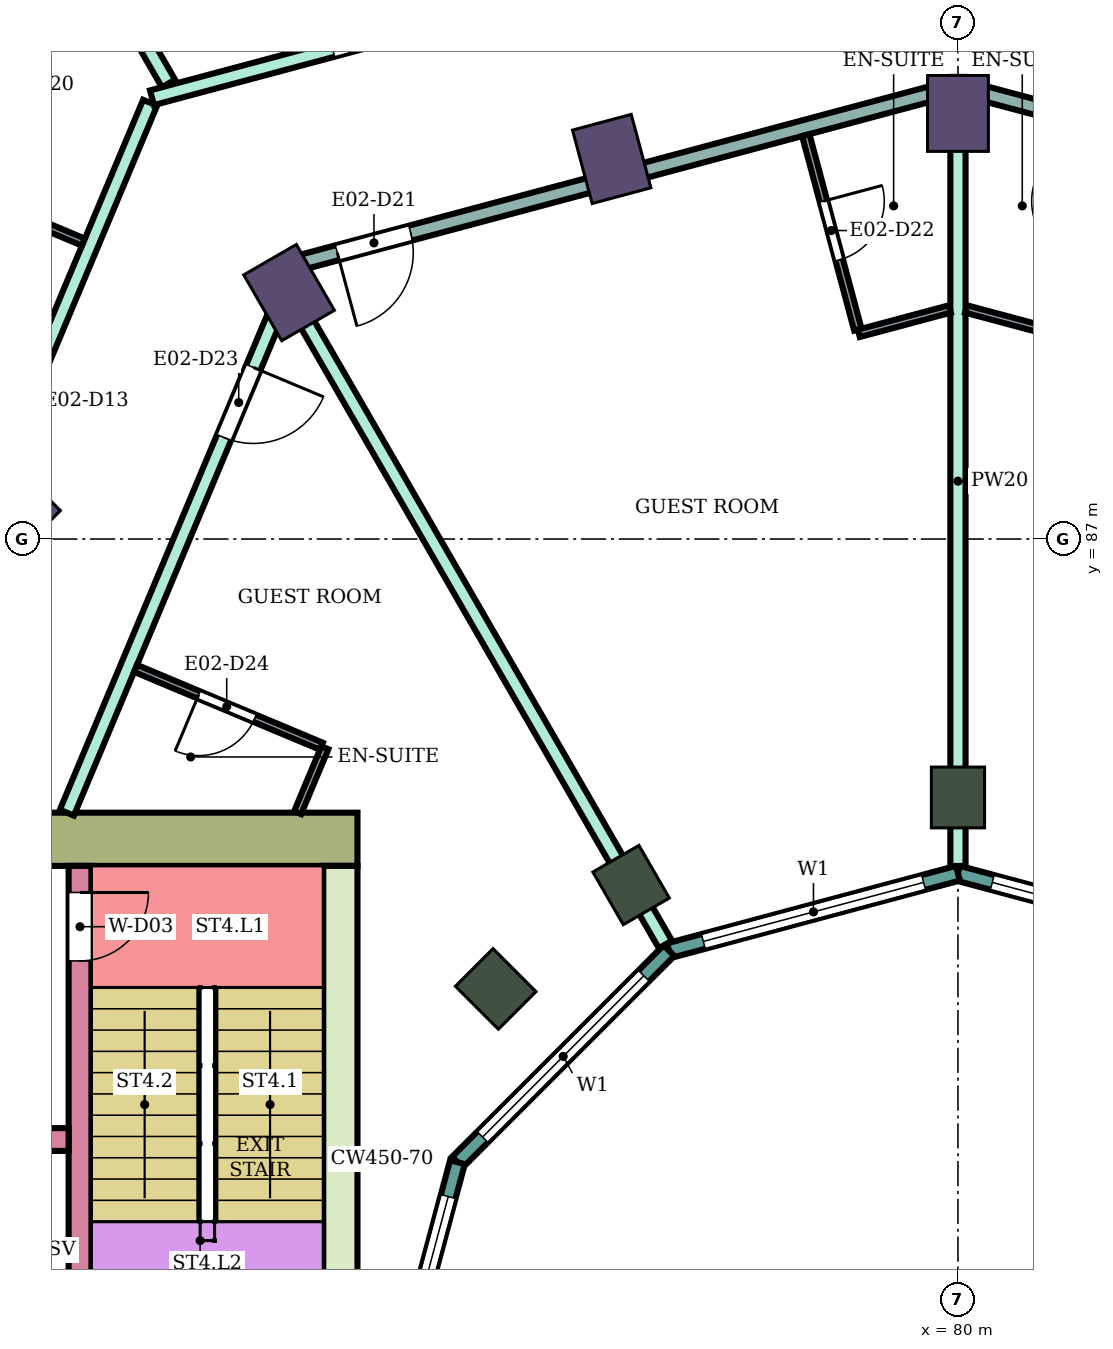
"""IFC4 building model, lengths in metres.
Left out: names, types, materials, properties, quantities, classifications, styles, units other than length and angle.
Written with IfcOpenShell. Run it as: python <this file> out.ifc"""

import sys

from ifc_helpers import new_model, si_unit, direction, frame, frame_2d, origin, origin_2d, place, context, subcontext, project, spatial, rectangle, extrude, element, fill, save


model = new_model("IFC4")
c1 = context("Model", 3, precision=1e-05, world=origin(), true_north=direction((0.0, 1.0)))
c2 = subcontext(c1, "Body", "Model", "MODEL_VIEW")
j1 = project(units=[si_unit("LENGTHUNIT", "METRE"), si_unit("PLANEANGLEUNIT", "RADIAN")], contexts=[c1])
p1 = place(None, origin())
s1 = spatial("IfcSite", under=j1, at=p1, CompositionType="ELEMENT")
p2 = place(p1, origin())
s2 = spatial("IfcBuilding", under=s1, at=p2, CompositionType="ELEMENT")
p3 = place(p2, frame((0.0, 0.0, 126.3)))
s3 = spatial("IfcBuildingStorey", under=s2, at=p3, CompositionType="ELEMENT", Elevation=126.3)
for number, where, z_axis, x_axis in (
    (1, (80.0, 92.6, 0.0), (0.0, 0.0, 1.0), (0.0, 1.0, 0.0)),
    (2, (75.445, 92.0, 0.0), (0.0, 0.0, 1.0), (-0.259, 0.966, 0.0)),
    (3, (71.2, 90.242, 0.0), (0.0, 0.0, 1.0), (-0.5, 0.866, 0.0)),
    (4, (67.555, 87.445, 0.0), (0.0, 0.0, 1.0), (-0.707, 0.707, 0.0)),
):
    element("IfcColumn", number, at=place(p3, frame(where, z_axis=z_axis, x_axis=x_axis)), inside=s3, PredefinedType="COLUMN", context=c2, shape_type="SweptSolid", body=[
        extrude(rectangle(XDim=1.0, YDim=0.8, at=origin_2d()), origin(), (0.0, 0.0, 1.0), 3.9),
    ])
for number, where, z_axis, x_axis in (
    (5, (80.0, 83.6, 0.0), (0.0, 0.0, 1.0), (0.0, 1.0, 0.0)),
    (6, (75.7, 82.448, 0.0), (0.0, 0.0, 1.0), (-0.5, 0.866, 0.0)),
    (7, (73.919, 81.081, 0.0), (0.0, 0.0, 1.0), (-0.707, 0.707, 0.0)),
):
    element("IfcColumn", number, at=place(p3, frame(where, z_axis=z_axis, x_axis=x_axis)), inside=s3, PredefinedType="COLUMN", context=c2, shape_type="SweptSolid", body=[
        extrude(rectangle(XDim=0.8, YDim=0.7, at=origin_2d()), origin(), (0.0, 0.0, 1.0), 3.9),
    ])
p4 = place(p3, frame((72.1, 83.05, 0.0), z_axis=(0.0, 0.0, 1.0), x_axis=(-1.0, 0.0, 0.0)))
e8 = element("IfcWall", 8, at=p4, inside=s3, PredefinedType="SHEAR", context=c2, shape_type="SweptSolid", body=[
    extrude(rectangle(XDim=14.8, YDim=0.7, at=frame_2d((7.4, 0.0))), origin(), (0.0, 0.0, 1.0), 3.58),
])
p5 = place(p4, frame((4.2, 0.0, 0.0)))
e9 = element("IfcOpeningElement", 9, at=p5, cuts=e8, PredefinedType="OPENING", context=c2, shape_type="SweptSolid", body=[
    extrude(rectangle(XDim=2.4, YDim=2.4, at=frame_2d((1.2, 1.2))), frame((0.0, 0.36, 0.0), z_axis=(0.0, -1.0, 0.0), x_axis=(1.0, 0.0, 0.0)), (0.0, 0.0, 1.0), 0.72),
])
p6 = place(p3, frame((71.875, 82.7, 0.0), z_axis=(0.0, 0.0, 1.0), x_axis=(0.0, -1.0, 0.0)))
e10 = element("IfcWall", 10, at=p6, inside=s3, PredefinedType="SHEAR", context=c2, shape_type="SweptSolid", body=[
    extrude(rectangle(XDim=7.7, YDim=0.45, at=frame_2d((3.85, 0.0))), origin(), (0.0, 0.0, 1.0), 3.58),
])
p7 = place(p3, frame((68.45, 82.7, 0.0), z_axis=(0.0, 0.0, 1.0), x_axis=(0.0, -1.0, 0.0)))
e11 = element("IfcWall", 11, at=p7, inside=s3, PredefinedType="SHEAR", context=c2, shape_type="SweptSolid", body=[
    extrude(rectangle(XDim=7.7, YDim=0.3, at=frame_2d((3.85, 0.0))), origin(), (0.0, 0.0, 1.0), 3.58),
])
p8 = place(p7, frame((0.35, 0.0, 0.0)))
e12 = element("IfcOpeningElement", 12, at=p8, cuts=e11, PredefinedType="OPENING", context=c2, shape_type="SweptSolid", body=[
    extrude(rectangle(XDim=0.9, YDim=2.1, at=frame_2d((0.45, 1.05))), frame((0.0, 0.16, 0.0), z_axis=(0.0, -1.0, 0.0), x_axis=(1.0, 0.0, 0.0)), (0.0, 0.0, 1.0), 0.32),
])
p9 = place(p3, frame((68.3, 79.1, 0.0), z_axis=(0.0, 0.0, 1.0), x_axis=(-1.0, 0.0, 0.0)))
e13 = element("IfcWall", 13, at=p9, inside=s3, PredefinedType="SHEAR", context=c2, shape_type="SweptSolid", body=[
    extrude(rectangle(XDim=11.0, YDim=0.3, at=frame_2d((5.5, 0.0))), origin(), (0.0, 0.0, 1.0), 3.58),
])
p10 = place(p9, frame((0.4, 0.0, 0.0)))
e14 = element("IfcOpeningElement", 14, at=p10, cuts=e13, PredefinedType="OPENING", context=c2, shape_type="SweptSolid", body=[
    extrude(rectangle(XDim=1.4, YDim=2.1, at=frame_2d((0.7, 1.05))), frame((0.0, 0.16, 0.0), z_axis=(0.0, -1.0, 0.0), x_axis=(1.0, 0.0, 0.0)), (0.0, 0.0, 1.0), 0.32),
])
p11 = place(p9, frame((5.4, 0.0, 0.0)))
e15 = element("IfcOpeningElement", 15, at=p11, cuts=e13, PredefinedType="OPENING", context=c2, shape_type="SweptSolid", body=[
    extrude(rectangle(XDim=1.4, YDim=2.1, at=frame_2d((0.7, 1.05))), frame((0.0, 0.16, 0.0), z_axis=(0.0, -1.0, 0.0), x_axis=(1.0, 0.0, 0.0)), (0.0, 0.0, 1.0), 0.32),
])
p12 = place(p9, frame((8.1, 0.0, 0.0)))
e16 = element("IfcOpeningElement", 16, at=p12, cuts=e13, PredefinedType="OPENING", context=c2, shape_type="SweptSolid", body=[
    extrude(rectangle(XDim=1.0, YDim=2.1, at=frame_2d((0.5, 1.05))), frame((0.0, 0.16, 0.0), z_axis=(0.0, -1.0, 0.0), x_axis=(1.0, 0.0, 0.0)), (0.0, 0.0, 1.0), 0.32),
])
p13 = place(p3, frame((83.802, 81.585, 0.0), z_axis=(0.0, 0.0, 1.0), x_axis=(-0.965933654434, 0.258789828301, 0.0)))
e17 = element("IfcWall", 17, at=p13, inside=s3, PredefinedType="NOTDEFINED", context=c2, shape_type="SweptSolid", body=[
    extrude(rectangle(XDim=3.936, YDim=0.2, at=frame_2d((1.968, 0.0))), origin(), (0.0, 0.0, 1.0), 3.9),
])
p14 = place(p13, frame((0.468, 0.0, 0.9)))
e18 = element("IfcOpeningElement", 18, at=p14, cuts=e17, PredefinedType="OPENING", context=c2, shape_type="SweptSolid", body=[
    extrude(rectangle(XDim=3.0, YDim=2.3, at=frame_2d((1.5, 1.15))), frame((0.0, 0.11, 0.0), z_axis=(0.0, -1.0, 0.0), x_axis=(1.0, 0.0, 0.0)), (0.0, 0.0, 1.0), 0.22),
])
p15 = place(p3, frame((80.0, 82.604, 0.0), z_axis=(0.0, 0.0, 1.0), x_axis=(-0.965933654434, -0.258789828301, 0.0)))
e19 = element("IfcWall", 19, at=p15, inside=s3, PredefinedType="NOTDEFINED", context=c2, shape_type="SweptSolid", body=[
    extrude(rectangle(XDim=3.936, YDim=0.2, at=frame_2d((1.968, 0.0))), origin(), (0.0, 0.0, 1.0), 3.9),
])
p16 = place(p15, frame((0.468, 0.0, 0.9)))
e20 = element("IfcOpeningElement", 20, at=p16, cuts=e19, PredefinedType="OPENING", context=c2, shape_type="SweptSolid", body=[
    extrude(rectangle(XDim=3.0, YDim=2.3, at=frame_2d((1.5, 1.15))), frame((0.0, 0.11, 0.0), z_axis=(0.0, -1.0, 0.0), x_axis=(1.0, 0.0, 0.0)), (0.0, 0.0, 1.0), 0.22),
])
p17 = place(p3, frame((76.198, 81.585, 0.0), z_axis=(0.0, 0.0, 1.0), x_axis=(-0.707106781187, -0.707106781187, 0.0)))
e21 = element("IfcWall", 21, at=p17, inside=s3, PredefinedType="NOTDEFINED", context=c2, shape_type="SweptSolid", body=[
    extrude(rectangle(XDim=3.936, YDim=0.2, at=frame_2d((1.968, 0.0))), origin(), (0.0, 0.0, 1.0), 3.9),
])
p18 = place(p17, frame((0.468, 0.0, 0.9)))
e22 = element("IfcOpeningElement", 22, at=p18, cuts=e21, PredefinedType="OPENING", context=c2, shape_type="SweptSolid", body=[
    extrude(rectangle(XDim=3.0, YDim=2.3, at=frame_2d((1.5, 1.15))), frame((0.0, 0.11, 0.0), z_axis=(0.0, -1.0, 0.0), x_axis=(1.0, 0.0, 0.0)), (0.0, 0.0, 1.0), 0.22),
])
p19 = place(p3, frame((73.415, 78.802, 0.0), z_axis=(0.0, 0.0, 1.0), x_axis=(-0.258789828301, -0.965933654434, 0.0)))
e23 = element("IfcWall", 23, at=p19, inside=s3, PredefinedType="NOTDEFINED", context=c2, shape_type="SweptSolid", body=[
    extrude(rectangle(XDim=3.936, YDim=0.2, at=frame_2d((1.968, 0.0))), origin(), (0.0, 0.0, 1.0), 3.9),
])
p20 = place(p19, frame((0.468, 0.0, 0.9)))
e24 = element("IfcOpeningElement", 24, at=p20, cuts=e23, PredefinedType="OPENING", context=c2, shape_type="SweptSolid", body=[
    extrude(rectangle(XDim=3.0, YDim=2.3, at=frame_2d((1.5, 1.15))), frame((0.0, 0.11, 0.0), z_axis=(0.0, -1.0, 0.0), x_axis=(1.0, 0.0, 0.0)), (0.0, 0.0, 1.0), 0.22),
])
p21 = place(p3, frame((66.085, 84.9, 0.0), z_axis=(0.0, 0.0, 1.0), x_axis=(0.386617151403, 0.922240303956, 0.0)))
e25 = element("IfcWall", 25, at=p21, inside=s3, PredefinedType="PARTITIONING", context=c2, shape_type="SweptSolid", body=[
    extrude(rectangle(XDim=8.5, YDim=0.2, at=frame_2d((4.25, 0.0))), origin(), (0.0, 0.0, 1.0), 3.45),
])
p22 = place(p21, frame((3.748, 0.0, 0.0)))
e26 = element("IfcOpeningElement", 26, at=p22, cuts=e25, PredefinedType="OPENING", context=c2, shape_type="SweptSolid", body=[
    extrude(rectangle(XDim=1.0, YDim=2.1, at=frame_2d((0.5, 1.05))), frame((0.0, 0.11, 0.0), z_axis=(0.0, -1.0, 0.0), x_axis=(1.0, 0.0, 0.0)), (0.0, 0.0, 1.0), 0.22),
])
p23 = place(p3, frame((67.104, 97.343, 0.0), z_axis=(0.0, 0.0, 1.0), x_axis=(0.499893606134, -0.866086821598, 0.0)))
e27 = element("IfcWall", 27, at=p23, inside=s3, PredefinedType="PARTITIONING", context=c2, shape_type="SweptSolid", body=[
    extrude(rectangle(XDim=5.021, YDim=0.2, at=frame_2d((2.511, 0.0))), origin(), (0.0, 0.0, 1.0), 3.45),
])
p24 = place(p3, frame((68.277, 83.4, 0.0), z_axis=(0.0, 0.0, 1.0), x_axis=(0.386454861164, 0.922308321703, 0.0)))
e28 = element("IfcWall", 28, at=p24, inside=s3, PredefinedType="PARTITIONING", context=c2, shape_type="SweptSolid", body=[
    extrude(rectangle(XDim=7.762, YDim=0.2, at=frame_2d((3.881, 0.0))), origin(), (0.0, 0.0, 1.0), 3.45),
])
p25 = place(p24, frame((5.351, 0.0, 0.0)))
e29 = element("IfcOpeningElement", 29, at=p25, cuts=e28, PredefinedType="OPENING", context=c2, shape_type="SweptSolid", body=[
    extrude(rectangle(XDim=1.0, YDim=2.1, at=frame_2d((0.5, 1.05))), frame((0.0, 0.11, 0.0), z_axis=(0.0, -1.0, 0.0), x_axis=(1.0, 0.0, 0.0)), (0.0, 0.0, 1.0), 0.22),
])
p26 = place(p3, frame((69.397, 92.805, 0.0), z_axis=(0.0, 0.0, 1.0), x_axis=(0.965971666602, 0.258647906087, 0.0)))
e30 = element("IfcWall", 30, at=p26, inside=s3, PredefinedType="PARTITIONING", context=c2, shape_type="SweptSolid", body=[
    extrude(rectangle(XDim=10.887, YDim=0.2, at=frame_2d((5.443, 0.0))), origin(), (0.0, 0.0, 1.0), 3.45),
])
p27 = place(p26, frame((6.163, 0.0, 0.0)))
e31 = element("IfcOpeningElement", 31, at=p27, cuts=e30, PredefinedType="OPENING", context=c2, shape_type="SweptSolid", body=[
    extrude(rectangle(XDim=1.0, YDim=2.1, at=frame_2d((0.5, 1.05))), frame((0.0, 0.11, 0.0), z_axis=(0.0, -1.0, 0.0), x_axis=(1.0, 0.0, 0.0)), (0.0, 0.0, 1.0), 0.22),
])
p28 = place(p26, frame((2.461, 0.0, 0.0)))
e32 = element("IfcOpeningElement", 32, at=p28, cuts=e30, PredefinedType="OPENING", context=c2, shape_type="SweptSolid", body=[
    extrude(rectangle(XDim=1.0, YDim=2.1, at=frame_2d((0.5, 1.05))), frame((0.0, 0.11, 0.0), z_axis=(0.0, -1.0, 0.0), x_axis=(1.0, 0.0, 0.0)), (0.0, 0.0, 1.0), 0.22),
])
p29 = place(p3, frame((71.263, 90.135, 0.0), z_axis=(0.0, 0.0, 1.0), x_axis=(0.499869438034, -0.86610077065, 0.0)))
e33 = element("IfcWall", 33, at=p29, inside=s3, PredefinedType="PARTITIONING", context=c2, shape_type="SweptSolid", body=[
    extrude(rectangle(XDim=9.777, YDim=0.2, at=frame_2d((4.889, 0.0))), origin(), (0.0, 0.0, 1.0), 3.45),
])
p30 = place(p3, frame((71.303, 90.625, 0.0), z_axis=(0.0, 0.0, 1.0), x_axis=(0.965971868307, 0.258647152776, 0.0)))
e34 = element("IfcWall", 34, at=p30, inside=s3, PredefinedType="PARTITIONING", context=c2, shape_type="SweptSolid", body=[
    extrude(rectangle(XDim=8.874, YDim=0.2, at=frame_2d((4.437, 0.0))), origin(), (0.0, 0.0, 1.0), 3.08),
])
p31 = place(p30, frame((0.55, 0.0, 0.0)))
e35 = element("IfcOpeningElement", 35, at=p31, cuts=e34, PredefinedType="OPENING", context=c2, shape_type="SweptSolid", body=[
    extrude(rectangle(XDim=1.0, YDim=2.1, at=frame_2d((0.5, 1.05))), frame((0.0, 0.11, 0.0), z_axis=(0.0, -1.0, 0.0), x_axis=(1.0, 0.0, 0.0)), (0.0, 0.0, 1.0), 0.22),
])
p32 = place(p3, frame((80.0, 82.699, 0.0), z_axis=(0.0, 0.0, 1.0), x_axis=(0.0, 1.0, 0.0)))
e36 = element("IfcWall", 36, at=p32, inside=s3, PredefinedType="PARTITIONING", context=c2, shape_type="SweptSolid", body=[
    extrude(rectangle(XDim=10.125, YDim=0.2, at=frame_2d((5.062, 0.0))), origin(), (0.0, 0.0, 1.0), 3.45),
])
p33 = place(p3, frame((80.0, 92.954, 0.0), z_axis=(0.0, 0.0, 1.0), x_axis=(0.96592536278, -0.258820774936, 0.0)))
e37 = element("IfcWall", 37, at=p33, inside=s3, PredefinedType="PARTITIONING", context=c2, shape_type="SweptSolid", body=[
    extrude(rectangle(XDim=8.934, YDim=0.2, at=frame_2d((4.467, 0.0))), origin(), (0.0, 0.0, 1.0), 3.08),
])
p34 = place(p33, frame((7.454, 0.0, 0.0)))
e38 = element("IfcOpeningElement", 38, at=p34, cuts=e37, PredefinedType="OPENING", context=c2, shape_type="SweptSolid", body=[
    extrude(rectangle(XDim=1.0, YDim=2.1, at=frame_2d((0.5, 1.05))), frame((0.0, 0.11, 0.0), z_axis=(0.0, -1.0, 0.0), x_axis=(1.0, 0.0, 0.0)), (0.0, 0.0, 1.0), 0.22),
])
p35 = place(p3, frame((80.0, 95.648, 0.0), z_axis=(0.0, 0.0, 1.0), x_axis=(0.965852259202, -0.259093445292, 0.0)))
e39 = element("IfcWall", 39, at=p35, inside=s3, PredefinedType="PARTITIONING", context=c2, shape_type="SweptSolid", body=[
    extrude(rectangle(XDim=10.597, YDim=0.2, at=frame_2d((5.298, 0.0))), origin(), (0.0, 0.0, 1.0), 3.45),
])
p36 = place(p35, frame((1.0, 0.0, 0.0)))
e40 = element("IfcOpeningElement", 40, at=p36, cuts=e39, PredefinedType="OPENING", context=c2, shape_type="SweptSolid", body=[
    extrude(rectangle(XDim=1.0, YDim=2.1, at=frame_2d((0.5, 1.05))), frame((0.0, 0.11, 0.0), z_axis=(0.0, -1.0, 0.0), x_axis=(1.0, 0.0, 0.0)), (0.0, 0.0, 1.0), 0.22),
])
p37 = place(p3, frame((66.049, 91.931, 0.0), z_axis=(0.0, 0.0, 1.0), x_axis=(0.922344808264, -0.38636777126, 0.0)))
e41 = element("IfcWall", 41, at=p37, inside=s3, PredefinedType="PARTITIONING", context=c2, shape_type="SweptSolid", body=[
    extrude(rectangle(XDim=2.65, YDim=0.1, at=frame_2d((1.325, 0.0))), origin(), (0.0, 0.0, 1.0), 3.45),
])
p38 = place(p3, frame((69.181, 85.298, 0.0), z_axis=(0.0, 0.0, 1.0), x_axis=(0.922377635784, -0.38628939541, 0.0)))
e42 = element("IfcWall", 42, at=p38, inside=s3, PredefinedType="PARTITIONING", context=c2, shape_type="SweptSolid", body=[
    extrude(rectangle(XDim=2.65, YDim=0.1, at=frame_2d((1.325, 0.0))), origin(), (0.0, 0.0, 1.0), 3.45),
])
p39 = place(p38, frame((0.9, 0.0, 0.0)))
e43 = element("IfcOpeningElement", 43, at=p39, cuts=e42, PredefinedType="OPENING", context=c2, shape_type="SweptSolid", body=[
    extrude(rectangle(XDim=0.8, YDim=2.1, at=frame_2d((0.4, 1.05))), frame((0.0, 0.06, 0.0), z_axis=(0.0, -1.0, 0.0), x_axis=(1.0, 0.0, 0.0)), (0.0, 0.0, 1.0), 0.12),
])
p40 = place(p3, frame((71.313, 83.4, 0.0), z_axis=(0.0, 0.0, 1.0), x_axis=(0.386148512695, 0.922436624459, 0.0)))
e44 = element("IfcWall", 44, at=p40, inside=s3, PredefinedType="PARTITIONING", context=c2, shape_type="SweptSolid", body=[
    extrude(rectangle(XDim=0.927, YDim=0.1, at=frame_2d((0.463, 0.0))), origin(), (0.0, 0.0, 1.0), 3.45),
])
p41 = place(p3, frame((77.998, 92.314, 0.0), z_axis=(0.0, 0.0, 1.0), x_axis=(0.258608674509, -0.965982170368, 0.0)))
e45 = element("IfcWall", 45, at=p41, inside=s3, PredefinedType="PARTITIONING", context=c2, shape_type="SweptSolid", body=[
    extrude(rectangle(XDim=2.65, YDim=0.1, at=frame_2d((1.325, 0.0))), origin(), (0.0, 0.0, 1.0), 3.45),
])
p42 = place(p41, frame((0.9, 0.0, 0.0)))
e46 = element("IfcOpeningElement", 46, at=p42, cuts=e45, PredefinedType="OPENING", context=c2, shape_type="SweptSolid", body=[
    extrude(rectangle(XDim=0.8, YDim=2.1, at=frame_2d((0.4, 1.05))), frame((0.0, 0.06, 0.0), z_axis=(0.0, -1.0, 0.0), x_axis=(1.0, 0.0, 0.0)), (0.0, 0.0, 1.0), 0.12),
])
p43 = place(p3, frame((78.696, 89.706, 0.0), z_axis=(0.0, 0.0, 1.0), x_axis=(0.966002513606, 0.258532674351, 0.0)))
e47 = element("IfcWall", 47, at=p43, inside=s3, PredefinedType="PARTITIONING", context=c2, shape_type="SweptSolid", body=[
    extrude(rectangle(XDim=1.24, YDim=0.1, at=frame_2d((0.62, 0.0))), origin(), (0.0, 0.0, 1.0), 3.45),
])
p44 = place(p3, frame((80.106, 90.027, 0.0), z_axis=(0.0, 0.0, 1.0), x_axis=(0.966002973184, -0.258530957139, 0.0)))
e48 = element("IfcWall", 48, at=p44, inside=s3, PredefinedType="PARTITIONING", context=c2, shape_type="SweptSolid", body=[
    extrude(rectangle(XDim=1.19, YDim=0.1, at=frame_2d((0.595, 0.0))), origin(), (0.0, 0.0, 1.0), 3.45),
])
p45 = place(p14, origin())
e49 = element("IfcWindow", 49, at=p45, inside=s3, PartitioningType="SINGLE_PANEL", PredefinedType="WINDOW", context=c2, shape_type="SweptSolid", body=[
    extrude(rectangle(XDim=3.0, YDim=2.3, at=frame_2d((1.5, 1.15))), frame((0.0, 0.03, 0.0), z_axis=(0.0, -1.0, 0.0), x_axis=(1.0, 0.0, 0.0)), (0.0, 0.0, 1.0), 0.06),
])
fill(e18, e49)
p46 = place(p16, origin())
e50 = element("IfcWindow", 50, at=p46, inside=s3, PartitioningType="SINGLE_PANEL", PredefinedType="WINDOW", context=c2, shape_type="SweptSolid", body=[
    extrude(rectangle(XDim=3.0, YDim=2.3, at=frame_2d((1.5, 1.15))), frame((0.0, 0.03, 0.0), z_axis=(0.0, -1.0, 0.0), x_axis=(1.0, 0.0, 0.0)), (0.0, 0.0, 1.0), 0.06),
])
fill(e20, e50)
p47 = place(p18, origin())
e51 = element("IfcWindow", 51, at=p47, inside=s3, PartitioningType="SINGLE_PANEL", PredefinedType="WINDOW", context=c2, shape_type="SweptSolid", body=[
    extrude(rectangle(XDim=3.0, YDim=2.3, at=frame_2d((1.5, 1.15))), frame((0.0, 0.03, 0.0), z_axis=(0.0, -1.0, 0.0), x_axis=(1.0, 0.0, 0.0)), (0.0, 0.0, 1.0), 0.06),
])
fill(e22, e51)
p48 = place(p20, origin())
e52 = element("IfcWindow", 52, at=p48, inside=s3, PartitioningType="SINGLE_PANEL", PredefinedType="WINDOW", context=c2, shape_type="SweptSolid", body=[
    extrude(rectangle(XDim=3.0, YDim=2.3, at=frame_2d((1.5, 1.15))), frame((0.0, 0.03, 0.0), z_axis=(0.0, -1.0, 0.0), x_axis=(1.0, 0.0, 0.0)), (0.0, 0.0, 1.0), 0.06),
])
fill(e24, e52)
p49 = place(p31, frame((1.0, 0.0, 0.0), z_axis=(0.0, 0.0, 1.0), x_axis=(-1.0, 0.0, 0.0)))
e53 = element("IfcDoor", 53, at=p49, inside=s3, OperationType="SINGLE_SWING_RIGHT", PredefinedType="DOOR", context=c2, shape_type="SweptSolid", body=[
    extrude(rectangle(XDim=1.0, YDim=2.1, at=frame_2d((0.5, 1.05))), frame((0.0, 0.025, 0.0), z_axis=(0.0, -1.0, 0.0), x_axis=(1.0, 0.0, 0.0)), (0.0, 0.0, 1.0), 0.05),
])
fill(e35, e53)
p50 = place(p42, origin())
e54 = element("IfcDoor", 54, at=p50, inside=s3, OperationType="SINGLE_SWING_LEFT", PredefinedType="DOOR", context=c2, shape_type="SweptSolid", body=[
    extrude(rectangle(XDim=0.8, YDim=2.1, at=frame_2d((0.4, 1.05))), frame((0.0, 0.025, 0.0), z_axis=(0.0, -1.0, 0.0), x_axis=(1.0, 0.0, 0.0)), (0.0, 0.0, 1.0), 0.05),
])
fill(e46, e54)
p51 = place(p25, frame((1.0, 0.0, 0.0), z_axis=(0.0, 0.0, 1.0), x_axis=(-1.0, 0.0, 0.0)))
e55 = element("IfcDoor", 55, at=p51, inside=s3, OperationType="SINGLE_SWING_LEFT", PredefinedType="DOOR", context=c2, shape_type="SweptSolid", body=[
    extrude(rectangle(XDim=1.0, YDim=2.1, at=frame_2d((0.5, 1.05))), frame((0.0, 0.025, 0.0), z_axis=(0.0, -1.0, 0.0), x_axis=(1.0, 0.0, 0.0)), (0.0, 0.0, 1.0), 0.05),
])
fill(e29, e55)
p52 = place(p39, frame((0.8, 0.0, 0.0), z_axis=(0.0, 0.0, 1.0), x_axis=(-1.0, 0.0, 0.0)))
e56 = element("IfcDoor", 56, at=p52, inside=s3, OperationType="SINGLE_SWING_RIGHT", PredefinedType="DOOR", context=c2, shape_type="SweptSolid", body=[
    extrude(rectangle(XDim=0.8, YDim=2.1, at=frame_2d((0.4, 1.05))), frame((0.0, 0.025, 0.0), z_axis=(0.0, -1.0, 0.0), x_axis=(1.0, 0.0, 0.0)), (0.0, 0.0, 1.0), 0.05),
])
fill(e43, e56)
p53 = place(p8, origin())
e57 = element("IfcDoor", 57, at=p53, inside=s3, OperationType="SINGLE_SWING_LEFT", PredefinedType="DOOR", context=c2, shape_type="SweptSolid", body=[
    extrude(rectangle(XDim=0.9, YDim=2.1, at=frame_2d((0.45, 1.05))), frame((0.0, 0.025, 0.0), z_axis=(0.0, -1.0, 0.0), x_axis=(1.0, 0.0, 0.0)), (0.0, 0.0, 1.0), 0.05),
])
fill(e12, e57)
save(model, sys.argv[1])
